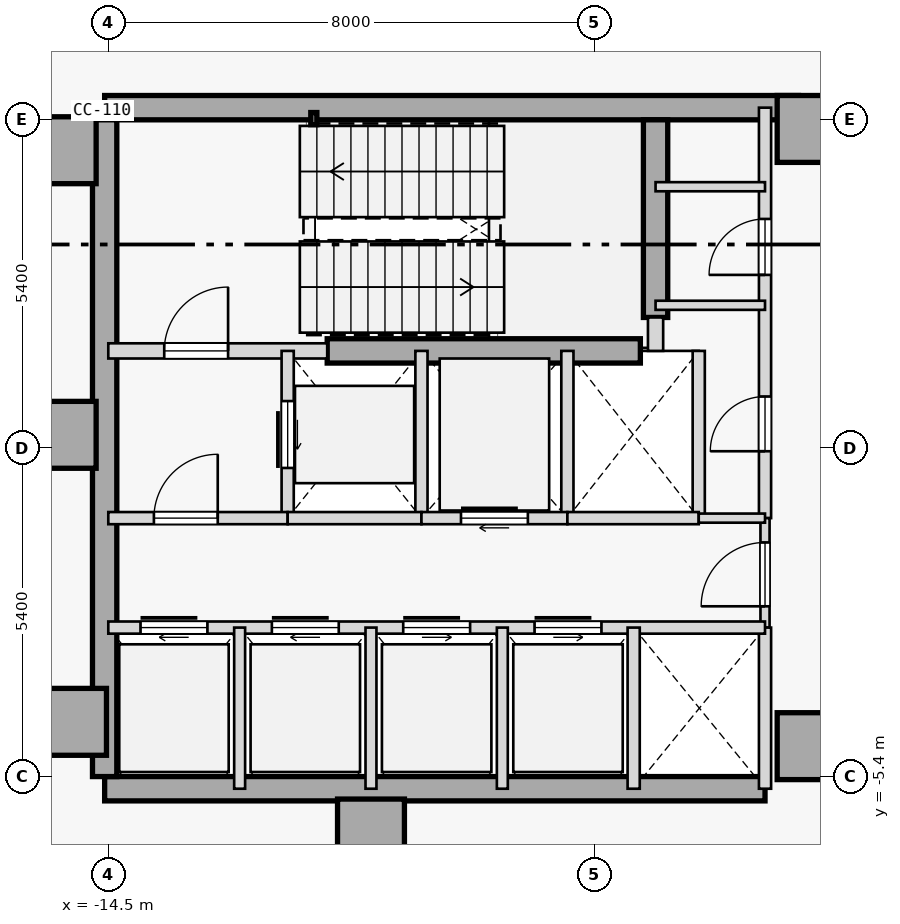
"""IFC4 building model, lengths in metres.
Left out: names, types, materials, properties, quantities, classifications, styles, units other than length and angle.
Written with IfcOpenShell. Run it as: python <this file> out.ifc"""

import sys

from ifc_helpers import new_model, si_unit, direction, frame, frame_2d, origin, origin_2d, place, context, subcontext, project, spatial, rectangle, hollow_rectangle, extrude, element, fill, save


model = new_model("IFC4")
c1 = context("Model", 3, precision=1e-05, world=origin(), true_north=direction((0.0, 1.0)))
c2 = subcontext(c1, "Body", "Model", "MODEL_VIEW")
j1 = project(units=[si_unit("LENGTHUNIT", "METRE"), si_unit("PLANEANGLEUNIT", "RADIAN")], contexts=[c1])
p1 = place(None, origin())
s1 = spatial("IfcSite", under=j1, at=p1, CompositionType="ELEMENT")
p2 = place(p1, origin())
s2 = spatial("IfcBuilding", under=s1, at=p2, CompositionType="ELEMENT")
p3 = place(p2, frame((0.0, 0.0, 83.2)))
s3 = spatial("IfcBuildingStorey", under=s2, at=p3, CompositionType="ELEMENT", Elevation=83.2)
for number, where, z_axis, x_axis in (
    (1, (-15.25, 4.9, 0.0), (0.0, 0.0, 1.0), (1.0, 0.0, 0.0)),
    (2, (-15.25, 0.22, 0.0), (0.0, 0.0, 1.0), (1.0, 0.0, 0.0)),
    (3, (-15.08, -4.5, 0.0), (0.0, 0.0, 1.0), (1.0, 0.0, 0.0)),
    (4, (-10.18, -6.32, 0.0), (0.0, 0.0, 1.0), (1.0, 0.0, 0.0)),
    (5, (-2.95, -4.9, 0.0), (0.0, 0.0, 1.0), (1.0, 0.0, 0.0)),
    (6, (-2.95, 5.25, 0.0), (0.0, 0.0, 1.0), (1.0, 0.0, 0.0)),
):
    element("IfcColumn", number, at=place(p3, frame(where, z_axis=z_axis, x_axis=x_axis)), inside=s3, PredefinedType="COLUMN", context=c2, shape_type="SweptSolid", body=[
        extrude(rectangle(XDim=1.1, YDim=1.1, at=origin_2d()), origin(), (0.0, 0.0, 1.0), 4.2),
    ])
p4 = place(p3, frame((-14.56, 5.6, 0.0), z_axis=(0.0, 0.0, 1.0), x_axis=(1.0, 0.0, 0.0)))
e7 = element("IfcWall", 7, at=p4, inside=s3, PredefinedType="SHEAR", context=c2, shape_type="SweptSolid", body=[
    extrude(rectangle(XDim=11.41, YDim=0.4, at=frame_2d((5.705, 0.0))), origin(), (0.0, 0.0, 1.0), 3.975),
])
p5 = place(p3, frame((-14.56, -5.6, 0.0), z_axis=(0.0, 0.0, 1.0), x_axis=(1.0, 0.0, 0.0)))
e8 = element("IfcWall", 8, at=p5, inside=s3, PredefinedType="SHEAR", context=c2, shape_type="SweptSolid", body=[
    extrude(rectangle(XDim=10.86, YDim=0.4, at=frame_2d((5.43, 0.0))), origin(), (0.0, 0.0, 1.0), 3.975),
])
p6 = place(p3, frame((-14.56, -5.4, 0.0), z_axis=(0.0, 0.0, 1.0), x_axis=(0.0, 1.0, 0.0)))
e9 = element("IfcWall", 9, at=p6, inside=s3, PredefinedType="SHEAR", context=c2, shape_type="SweptSolid", body=[
    extrude(rectangle(XDim=10.8, YDim=0.4, at=frame_2d((5.4, 0.0))), origin(), (0.0, 0.0, 1.0), 3.975),
])
p7 = place(p3, frame((-5.5, 2.15, 0.0), z_axis=(0.0, 0.0, 1.0), x_axis=(0.0, 1.0, 0.0)))
e10 = element("IfcWall", 10, at=p7, inside=s3, PredefinedType="SHEAR", context=c2, shape_type="SweptSolid", body=[
    extrude(rectangle(XDim=3.25, YDim=0.4, at=frame_2d((1.625, 0.0))), origin(), (0.0, 0.0, 1.0), 3.975),
])
p8 = place(p3, frame((-10.9, 1.6, 0.0), z_axis=(0.0, 0.0, 1.0), x_axis=(1.0, 0.0, 0.0)))
e11 = element("IfcWall", 11, at=p8, inside=s3, PredefinedType="SHEAR", context=c2, shape_type="SweptSolid", body=[
    extrude(rectangle(XDim=5.15, YDim=0.4, at=frame_2d((2.575, 0.0))), origin(), (0.0, 0.0, 1.0), 3.975),
])
p9 = place(p3, frame((-11.12, 5.42, 0.0), z_axis=(0.0, 0.0, 1.0), x_axis=(1.0, 0.0, 0.0)))
e12 = element("IfcColumn", 12, at=p9, inside=s3, PredefinedType="COLUMN", context=c2, shape_type="SweptSolid", body=[
    extrude(hollow_rectangle(XDim=0.1, YDim=0.2, WallThickness=0.008, at=origin_2d()), origin(), (0.0, 0.0, 1.0), 4.2),
])
p10 = place(p3, frame((-14.5, 1.6, 0.0), z_axis=(0.0, 0.0, 1.0), x_axis=(1.0, 0.0, 0.0)))
e13 = element("IfcWall", 13, at=p10, inside=s3, PredefinedType="STANDARD", context=c2, shape_type="SweptSolid", body=[
    extrude(rectangle(XDim=3.6, YDim=0.25, at=frame_2d((1.8, 0.0))), origin(), (0.0, 0.0, 1.0), 3.975),
])
p11 = place(p10, frame((0.92, 0.0, 0.0)))
e14 = element("IfcOpeningElement", 14, at=p11, cuts=e13, PredefinedType="OPENING", context=c2, shape_type="SweptSolid", body=[
    extrude(rectangle(XDim=1.05, YDim=2.15, at=frame_2d((0.525, 1.075))), frame((0.0, 0.135, 0.0), z_axis=(0.0, -1.0, 0.0), x_axis=(1.0, 0.0, 0.0)), (0.0, 0.0, 1.0), 0.27),
])
p12 = place(p3, frame((-5.5, 1.6, 0.0), z_axis=(0.0, 0.0, 1.0), x_axis=(0.0, 1.0, 0.0)))
e15 = element("IfcWall", 15, at=p12, inside=s3, PredefinedType="STANDARD", context=c2, shape_type="SweptSolid", body=[
    extrude(rectangle(XDim=0.55, YDim=0.25, at=frame_2d((0.275, 0.0))), origin(), (0.0, 0.0, 1.0), 3.975),
])
p13 = place(p3, frame((-3.7, -1.15, 0.0), z_axis=(0.0, 0.0, 1.0), x_axis=(0.0, 1.0, 0.0)))
e16 = element("IfcWall", 16, at=p13, inside=s3, PredefinedType="STANDARD", context=c2, shape_type="SweptSolid", body=[
    extrude(rectangle(XDim=6.75, YDim=0.2, at=frame_2d((3.375, 0.0))), origin(), (0.0, 0.0, 1.0), 3.975),
])
p14 = place(p13, frame((1.1, 0.0, 0.0)))
e17 = element("IfcOpeningElement", 17, at=p14, cuts=e16, PredefinedType="OPENING", context=c2, shape_type="SweptSolid", body=[
    extrude(rectangle(XDim=0.9, YDim=2.15, at=frame_2d((0.45, 1.075))), frame((0.0, 0.11, 0.0), z_axis=(0.0, -1.0, 0.0), x_axis=(1.0, 0.0, 0.0)), (0.0, 0.0, 1.0), 0.22),
])
p15 = place(p13, frame((4.0, 0.0, 0.0)))
e18 = element("IfcOpeningElement", 18, at=p15, cuts=e16, PredefinedType="OPENING", context=c2, shape_type="SweptSolid", body=[
    extrude(rectangle(XDim=0.92, YDim=2.15, at=frame_2d((0.46, 1.075))), frame((0.0, 0.11, 0.0), z_axis=(0.0, -1.0, 0.0), x_axis=(1.0, 0.0, 0.0)), (0.0, 0.0, 1.0), 0.22),
])
p16 = place(p3, frame((-3.7, -2.95, 0.0), z_axis=(0.0, 0.0, 1.0), x_axis=(0.0, 1.0, 0.0)))
e19 = element("IfcWall", 19, at=p16, inside=s3, PredefinedType="PARTITIONING", context=c2, shape_type="SweptSolid", body=[
    extrude(rectangle(XDim=1.8, YDim=0.15, at=frame_2d((0.9, 0.0))), origin(), (0.0, 0.0, 1.0), 3.975),
])
p17 = place(p16, frame((0.35, 0.0, 0.0)))
e20 = element("IfcOpeningElement", 20, at=p17, cuts=e19, PredefinedType="OPENING", context=c2, shape_type="SweptSolid", body=[
    extrude(rectangle(XDim=1.05, YDim=2.18, at=frame_2d((0.525, 1.09))), frame((0.0, 0.085, 0.0), z_axis=(0.0, -1.0, 0.0), x_axis=(1.0, 0.0, 0.0)), (0.0, 0.0, 1.0), 0.17),
])
p18 = place(p3, frame((-3.7, -5.6, 0.0), z_axis=(0.0, 0.0, 1.0), x_axis=(0.0, 1.0, 0.0)))
e21 = element("IfcWall", 21, at=p18, inside=s3, PredefinedType="STANDARD", context=c2, shape_type="SweptSolid", body=[
    extrude(rectangle(XDim=2.65, YDim=0.2, at=frame_2d((1.325, 0.0))), origin(), (0.0, 0.0, 1.0), 3.975),
])
p19 = place(p3, frame((-11.55, -1.15, 0.0), z_axis=(0.0, 0.0, 1.0), x_axis=(0.0, 1.0, 0.0)))
e22 = element("IfcWall", 22, at=p19, inside=s3, PredefinedType="STANDARD", context=c2, shape_type="SweptSolid", body=[
    extrude(rectangle(XDim=2.75, YDim=0.2, at=frame_2d((1.375, 0.0))), origin(), (0.0, 0.0, 1.0), 3.975),
])
p20 = place(p19, frame((0.825, 0.0, 0.0)))
e23 = element("IfcOpeningElement", 23, at=p20, cuts=e22, PredefinedType="OPENING", context=c2, shape_type="SweptSolid", body=[
    extrude(rectangle(XDim=1.1, YDim=2.15, at=frame_2d((0.55, 1.075))), frame((0.0, 0.11, 0.0), z_axis=(0.0, -1.0, 0.0), x_axis=(1.0, 0.0, 0.0)), (0.0, 0.0, 1.0), 0.22),
])
p21 = place(p3, frame((-9.35, -1.15, 0.0), z_axis=(0.0, 0.0, 1.0), x_axis=(0.0, 1.0, 0.0)))
e24 = element("IfcWall", 24, at=p21, inside=s3, PredefinedType="STANDARD", context=c2, shape_type="SweptSolid", body=[
    extrude(rectangle(XDim=2.75, YDim=0.2, at=frame_2d((1.375, 0.0))), origin(), (0.0, 0.0, 1.0), 3.975),
])
p22 = place(p3, frame((-14.5, -1.15, 0.0), z_axis=(0.0, 0.0, 1.0), x_axis=(1.0, 0.0, 0.0)))
e25 = element("IfcWall", 25, at=p22, inside=s3, PredefinedType="STANDARD", context=c2, shape_type="SweptSolid", body=[
    extrude(rectangle(XDim=2.95, YDim=0.2, at=frame_2d((1.475, 0.0))), origin(), (0.0, 0.0, 1.0), 3.975),
])
p23 = place(p22, frame((0.75, 0.0, 0.0)))
e26 = element("IfcOpeningElement", 26, at=p23, cuts=e25, PredefinedType="OPENING", context=c2, shape_type="SweptSolid", body=[
    extrude(rectangle(XDim=1.05, YDim=2.18, at=frame_2d((0.525, 1.09))), frame((0.0, 0.11, 0.0), z_axis=(0.0, -1.0, 0.0), x_axis=(1.0, 0.0, 0.0)), (0.0, 0.0, 1.0), 0.22),
])
p24 = place(p3, frame((-11.55, -1.15, 0.0), z_axis=(0.0, 0.0, 1.0), x_axis=(1.0, 0.0, 0.0)))
e27 = element("IfcWall", 27, at=p24, inside=s3, PredefinedType="STANDARD", context=c2, shape_type="SweptSolid", body=[
    extrude(rectangle(XDim=2.2, YDim=0.2, at=frame_2d((1.1, 0.0))), origin(), (0.0, 0.0, 1.0), 3.975),
])
p25 = place(p3, frame((-6.95, -1.15, 0.0), z_axis=(0.0, 0.0, 1.0), x_axis=(0.0, 1.0, 0.0)))
e28 = element("IfcWall", 28, at=p25, inside=s3, PredefinedType="STANDARD", context=c2, shape_type="SweptSolid", body=[
    extrude(rectangle(XDim=2.75, YDim=0.2, at=frame_2d((1.375, 0.0))), origin(), (0.0, 0.0, 1.0), 3.975),
])
p26 = place(p3, frame((-9.35, -1.15, 0.0), z_axis=(0.0, 0.0, 1.0), x_axis=(1.0, 0.0, 0.0)))
e29 = element("IfcWall", 29, at=p26, inside=s3, PredefinedType="STANDARD", context=c2, shape_type="SweptSolid", body=[
    extrude(rectangle(XDim=2.4, YDim=0.2, at=frame_2d((1.2, 0.0))), origin(), (0.0, 0.0, 1.0), 3.975),
])
p27 = place(p26, frame((0.65, 0.0, 0.0)))
e30 = element("IfcOpeningElement", 30, at=p27, cuts=e29, PredefinedType="OPENING", context=c2, shape_type="SweptSolid", body=[
    extrude(rectangle(XDim=1.1, YDim=2.15, at=frame_2d((0.55, 1.075))), frame((0.0, 0.11, 0.0), z_axis=(0.0, -1.0, 0.0), x_axis=(1.0, 0.0, 0.0)), (0.0, 0.0, 1.0), 0.22),
])
p28 = place(p3, frame((-4.79, -1.15, 0.0), z_axis=(0.0, 0.0, 1.0), x_axis=(0.0, 1.0, 0.0)))
e31 = element("IfcWall", 31, at=p28, inside=s3, PredefinedType="STANDARD", context=c2, shape_type="SweptSolid", body=[
    extrude(rectangle(XDim=2.75, YDim=0.2, at=frame_2d((1.375, 0.0))), origin(), (0.0, 0.0, 1.0), 3.975),
])
p29 = place(p3, frame((-6.95, -1.15, 0.0), z_axis=(0.0, 0.0, 1.0), x_axis=(1.0, 0.0, 0.0)))
e32 = element("IfcWall", 32, at=p29, inside=s3, PredefinedType="STANDARD", context=c2, shape_type="SweptSolid", body=[
    extrude(rectangle(XDim=2.16, YDim=0.2, at=frame_2d((1.08, 0.0))), origin(), (0.0, 0.0, 1.0), 3.975),
])
p30 = place(p3, frame((-4.79, -1.15, 0.0), z_axis=(0.0, 0.0, 1.0), x_axis=(1.0, 0.0, 0.0)))
e33 = element("IfcWall", 33, at=p30, inside=s3, PredefinedType="PARTITIONING", context=c2, shape_type="SweptSolid", body=[
    extrude(rectangle(XDim=1.09, YDim=0.15, at=frame_2d((0.545, 0.0))), origin(), (0.0, 0.0, 1.0), 3.975),
])
p31 = place(p3, frame((-14.5, -2.95, 0.0), z_axis=(0.0, 0.0, 1.0), x_axis=(1.0, 0.0, 0.0)))
e34 = element("IfcWall", 34, at=p31, inside=s3, PredefinedType="STANDARD", context=c2, shape_type="SweptSolid", body=[
    extrude(rectangle(XDim=10.8, YDim=0.2, at=frame_2d((5.4, 0.0))), origin(), (0.0, 0.0, 1.0), 3.975),
])
p32 = place(p31, frame((0.53, 0.0, 0.0)))
e35 = element("IfcOpeningElement", 35, at=p32, cuts=e34, PredefinedType="OPENING", context=c2, shape_type="SweptSolid", body=[
    extrude(rectangle(XDim=1.1, YDim=2.15, at=frame_2d((0.55, 1.075))), frame((0.0, 0.11, 0.0), z_axis=(0.0, -1.0, 0.0), x_axis=(1.0, 0.0, 0.0)), (0.0, 0.0, 1.0), 0.22),
])
p33 = place(p31, frame((2.69, 0.0, 0.0)))
e36 = element("IfcOpeningElement", 36, at=p33, cuts=e34, PredefinedType="OPENING", context=c2, shape_type="SweptSolid", body=[
    extrude(rectangle(XDim=1.1, YDim=2.15, at=frame_2d((0.55, 1.075))), frame((0.0, 0.11, 0.0), z_axis=(0.0, -1.0, 0.0), x_axis=(1.0, 0.0, 0.0)), (0.0, 0.0, 1.0), 0.22),
])
p34 = place(p31, frame((4.85, 0.0, 0.0)))
e37 = element("IfcOpeningElement", 37, at=p34, cuts=e34, PredefinedType="OPENING", context=c2, shape_type="SweptSolid", body=[
    extrude(rectangle(XDim=1.1, YDim=2.15, at=frame_2d((0.55, 1.075))), frame((0.0, 0.11, 0.0), z_axis=(0.0, -1.0, 0.0), x_axis=(1.0, 0.0, 0.0)), (0.0, 0.0, 1.0), 0.22),
])
p35 = place(p31, frame((7.01, 0.0, 0.0)))
e38 = element("IfcOpeningElement", 38, at=p35, cuts=e34, PredefinedType="OPENING", context=c2, shape_type="SweptSolid", body=[
    extrude(rectangle(XDim=1.1, YDim=2.15, at=frame_2d((0.55, 1.075))), frame((0.0, 0.11, 0.0), z_axis=(0.0, -1.0, 0.0), x_axis=(1.0, 0.0, 0.0)), (0.0, 0.0, 1.0), 0.22),
])
p36 = place(p3, frame((-5.86, -5.6, 0.0), z_axis=(0.0, 0.0, 1.0), x_axis=(0.0, 1.0, 0.0)))
e39 = element("IfcWall", 39, at=p36, inside=s3, PredefinedType="STANDARD", context=c2, shape_type="SweptSolid", body=[
    extrude(rectangle(XDim=2.65, YDim=0.2, at=frame_2d((1.325, 0.0))), origin(), (0.0, 0.0, 1.0), 3.975),
])
for number, where, z_axis, x_axis in (
    (40, (-12.34, -5.6, 0.0), (0.0, 0.0, 1.0), (0.0, 1.0, 0.0)),
    (41, (-10.18, -5.6, 0.0), (0.0, 0.0, 1.0), (0.0, 1.0, 0.0)),
    (42, (-8.02, -5.6, 0.0), (0.0, 0.0, 1.0), (0.0, 1.0, 0.0)),
):
    element("IfcWall", number, at=place(p3, frame(where, z_axis=z_axis, x_axis=x_axis)), inside=s3, PredefinedType="STANDARD", context=c2, shape_type="SweptSolid", body=[
        extrude(rectangle(XDim=2.65, YDim=0.18, at=frame_2d((1.325, 0.0))), origin(), (0.0, 0.0, 1.0), 3.975),
    ])
for number, where, z_axis, x_axis in (
    (43, (-5.5, 4.3, 0.0), (0.0, 0.0, 1.0), (1.0, 0.0, 0.0)),
    (44, (-5.5, 2.35, 0.0), (0.0, 0.0, 1.0), (1.0, 0.0, 0.0)),
):
    element("IfcWall", number, at=place(p3, frame(where, z_axis=z_axis, x_axis=x_axis)), inside=s3, PredefinedType="PARTITIONING", context=c2, shape_type="SweptSolid", body=[
        extrude(rectangle(XDim=1.8, YDim=0.15, at=frame_2d((0.9, 0.0))), origin(), (0.0, 0.0, 1.0), 3.975),
    ])
p37 = place(p11, origin())
e45 = element("IfcDoor", 45, at=p37, inside=s3, OperationType="SINGLE_SWING_RIGHT", PredefinedType="DOOR", context=c2, shape_type="SweptSolid", body=[
    extrude(rectangle(XDim=1.05, YDim=2.15, at=frame_2d((0.525, 1.075))), frame((0.0, 0.025, 0.0), z_axis=(0.0, -1.0, 0.0), x_axis=(1.0, 0.0, 0.0)), (0.0, 0.0, 1.0), 0.05),
])
fill(e14, e45)
p38 = place(p23, origin())
e46 = element("IfcDoor", 46, at=p38, inside=s3, OperationType="SINGLE_SWING_RIGHT", PredefinedType="DOOR", context=c2, shape_type="SweptSolid", body=[
    extrude(rectangle(XDim=1.05, YDim=2.18, at=frame_2d((0.525, 1.09))), frame((0.0, 0.025, 0.0), z_axis=(0.0, -1.0, 0.0), x_axis=(1.0, 0.0, 0.0)), (0.0, 0.0, 1.0), 0.05),
])
fill(e26, e46)
p39 = place(p17, origin())
e47 = element("IfcDoor", 47, at=p39, inside=s3, OperationType="SINGLE_SWING_LEFT", PredefinedType="DOOR", context=c2, shape_type="SweptSolid", body=[
    extrude(rectangle(XDim=1.05, YDim=2.18, at=frame_2d((0.525, 1.09))), frame((0.0, 0.025, 0.0), z_axis=(0.0, -1.0, 0.0), x_axis=(1.0, 0.0, 0.0)), (0.0, 0.0, 1.0), 0.05),
])
fill(e20, e47)
p40 = place(p20, origin())
e48 = element("IfcDoor", 48, at=p40, inside=s3, OperationType="SLIDING_TO_RIGHT", PredefinedType="DOOR", context=c2, shape_type="SweptSolid", body=[
    extrude(rectangle(XDim=1.1, YDim=2.15, at=frame_2d((0.55, 1.075))), frame((0.0, 0.025, 0.0), z_axis=(0.0, -1.0, 0.0), x_axis=(1.0, 0.0, 0.0)), (0.0, 0.0, 1.0), 0.05),
])
fill(e23, e48)
p41 = place(p27, origin())
e49 = element("IfcDoor", 49, at=p41, inside=s3, OperationType="SLIDING_TO_RIGHT", PredefinedType="DOOR", context=c2, shape_type="SweptSolid", body=[
    extrude(rectangle(XDim=1.1, YDim=2.15, at=frame_2d((0.55, 1.075))), frame((0.0, 0.025, 0.0), z_axis=(0.0, -1.0, 0.0), x_axis=(1.0, 0.0, 0.0)), (0.0, 0.0, 1.0), 0.05),
])
fill(e30, e49)
p42 = place(p32, origin())
e50 = element("IfcDoor", 50, at=p42, inside=s3, OperationType="SLIDING_TO_RIGHT", PredefinedType="DOOR", context=c2, shape_type="SweptSolid", body=[
    extrude(rectangle(XDim=1.1, YDim=2.15, at=frame_2d((0.55, 1.075))), frame((0.0, 0.025, 0.0), z_axis=(0.0, -1.0, 0.0), x_axis=(1.0, 0.0, 0.0)), (0.0, 0.0, 1.0), 0.05),
])
fill(e35, e50)
p43 = place(p33, origin())
e51 = element("IfcDoor", 51, at=p43, inside=s3, OperationType="SLIDING_TO_RIGHT", PredefinedType="DOOR", context=c2, shape_type="SweptSolid", body=[
    extrude(rectangle(XDim=1.1, YDim=2.15, at=frame_2d((0.55, 1.075))), frame((0.0, 0.025, 0.0), z_axis=(0.0, -1.0, 0.0), x_axis=(1.0, 0.0, 0.0)), (0.0, 0.0, 1.0), 0.05),
])
fill(e36, e51)
p44 = place(p34, origin())
e52 = element("IfcDoor", 52, at=p44, inside=s3, OperationType="SLIDING_TO_LEFT", PredefinedType="DOOR", context=c2, shape_type="SweptSolid", body=[
    extrude(rectangle(XDim=1.1, YDim=2.15, at=frame_2d((0.55, 1.075))), frame((0.0, 0.025, 0.0), z_axis=(0.0, -1.0, 0.0), x_axis=(1.0, 0.0, 0.0)), (0.0, 0.0, 1.0), 0.05),
])
fill(e37, e52)
p45 = place(p35, origin())
e53 = element("IfcDoor", 53, at=p45, inside=s3, OperationType="SLIDING_TO_LEFT", PredefinedType="DOOR", context=c2, shape_type="SweptSolid", body=[
    extrude(rectangle(XDim=1.1, YDim=2.15, at=frame_2d((0.55, 1.075))), frame((0.0, 0.025, 0.0), z_axis=(0.0, -1.0, 0.0), x_axis=(1.0, 0.0, 0.0)), (0.0, 0.0, 1.0), 0.05),
])
fill(e38, e53)
p46 = place(p14, origin())
e54 = element("IfcDoor", 54, at=p46, inside=s3, OperationType="SINGLE_SWING_LEFT", PredefinedType="DOOR", context=c2, shape_type="SweptSolid", body=[
    extrude(rectangle(XDim=0.9, YDim=2.15, at=frame_2d((0.45, 1.075))), frame((0.0, 0.025, 0.0), z_axis=(0.0, -1.0, 0.0), x_axis=(1.0, 0.0, 0.0)), (0.0, 0.0, 1.0), 0.05),
])
fill(e17, e54)
p47 = place(p15, origin())
e55 = element("IfcDoor", 55, at=p47, inside=s3, OperationType="SINGLE_SWING_LEFT", PredefinedType="DOOR", context=c2, shape_type="SweptSolid", body=[
    extrude(rectangle(XDim=0.92, YDim=2.15, at=frame_2d((0.46, 1.075))), frame((0.0, 0.025, 0.0), z_axis=(0.0, -1.0, 0.0), x_axis=(1.0, 0.0, 0.0)), (0.0, 0.0, 1.0), 0.05),
])
fill(e18, e55)
save(model, sys.argv[1])
